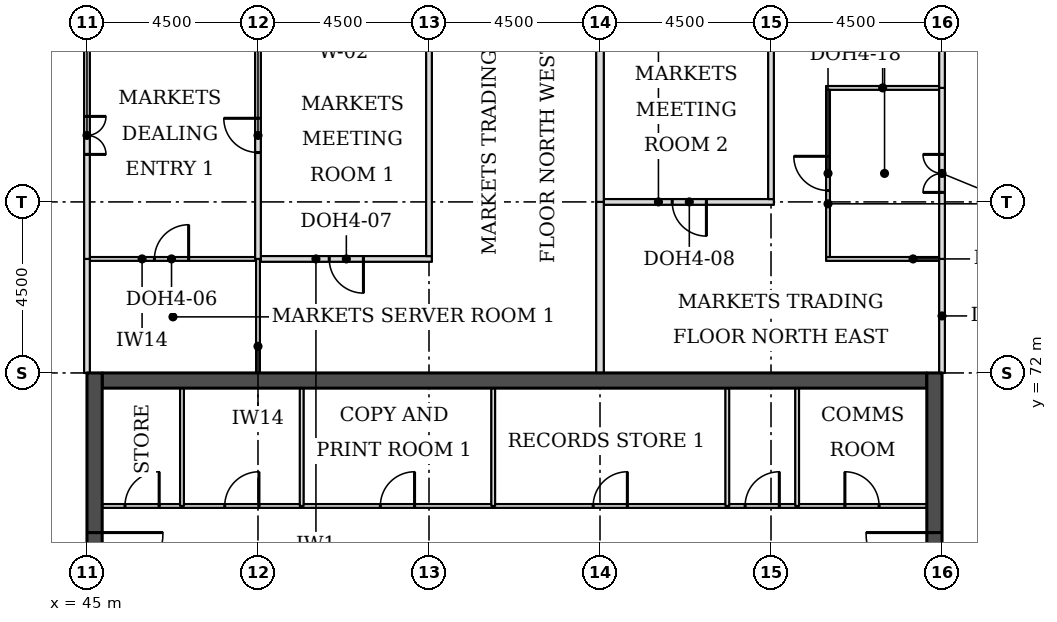
"""IFC4 building model, lengths in metres.
Left out: names, types, materials, properties, quantities, classifications, styles, units other than length and angle.
Written with IfcOpenShell. Run it as: python <this file> out.ifc"""

import sys

from ifc_helpers import new_model, si_unit, direction, frame, frame_2d, origin, place, context, subcontext, project, spatial, rectangle, extrude, element, fill, save


model = new_model("IFC4")
c1 = context("Model", 3, precision=1e-05, world=origin(), true_north=direction((0.0, 1.0)))
c2 = subcontext(c1, "Body", "Model", "MODEL_VIEW")
j1 = project(units=[si_unit("LENGTHUNIT", "METRE"), si_unit("PLANEANGLEUNIT", "RADIAN")], contexts=[c1])
p1 = place(None, origin())
s1 = spatial("IfcSite", under=j1, at=p1, CompositionType="ELEMENT")
p2 = place(p1, origin())
s2 = spatial("IfcBuilding", under=s1, at=p2, CompositionType="ELEMENT")
p3 = place(p2, frame((0.0, 0.0, 169.9)))
s3 = spatial("IfcBuildingStorey", under=s2, at=p3, CompositionType="ELEMENT", Elevation=169.9)
p4 = place(p3, frame((45.4, 71.8, 0.0), z_axis=(0.0, 0.0, 1.0), x_axis=(1.0, 0.0, 0.0)))
e1 = element("IfcWall", 1, at=p4, inside=s3, PredefinedType="SHEAR", context=c2, shape_type="SweptSolid", body=[
    extrude(rectangle(XDim=21.7, YDim=0.4, at=frame_2d((10.85, 0.0))), origin(), (0.0, 0.0, 1.0), 3.7),
])
p5 = place(p3, frame((45.2, 49.5, 0.0), z_axis=(0.0, 0.0, 1.0), x_axis=(0.0, 1.0, 0.0)))
e2 = element("IfcWall", 2, at=p5, inside=s3, PredefinedType="SHEAR", context=c2, shape_type="SweptSolid", body=[
    extrude(rectangle(XDim=22.5, YDim=0.4, at=frame_2d((11.25, 0.0))), origin(), (0.0, 0.0, 1.0), 3.7),
])
p6 = place(p5, frame((4.2, 0.0, 0.0)))
e3 = element("IfcOpeningElement", 3, at=p6, cuts=e2, PredefinedType="OPENING", context=c2, shape_type="SweptSolid", body=[
    extrude(rectangle(XDim=1.8, YDim=2.1, at=frame_2d((0.9, 1.05))), frame((0.0, 0.21, 0.0), z_axis=(0.0, -1.0, 0.0), x_axis=(1.0, 0.0, 0.0)), (0.0, 0.0, 1.0), 0.42),
])
p7 = place(p5, frame((6.9, 0.0, 0.0)))
e4 = element("IfcOpeningElement", 4, at=p7, cuts=e2, PredefinedType="OPENING", context=c2, shape_type="SweptSolid", body=[
    extrude(rectangle(XDim=1.1, YDim=2.1, at=frame_2d((0.55, 1.05))), frame((0.0, 0.21, 0.0), z_axis=(0.0, -1.0, 0.0), x_axis=(1.0, 0.0, 0.0)), (0.0, 0.0, 1.0), 0.42),
])
p8 = place(p5, frame((13.6, 0.0, 0.0)))
e5 = element("IfcOpeningElement", 5, at=p8, cuts=e2, PredefinedType="OPENING", context=c2, shape_type="SweptSolid", body=[
    extrude(rectangle(XDim=1.1, YDim=2.1, at=frame_2d((0.55, 1.05))), frame((0.0, 0.21, 0.0), z_axis=(0.0, -1.0, 0.0), x_axis=(1.0, 0.0, 0.0)), (0.0, 0.0, 1.0), 0.42),
])
p9 = place(p5, frame((16.5, 0.0, 0.0)))
e6 = element("IfcOpeningElement", 6, at=p9, cuts=e2, PredefinedType="OPENING", context=c2, shape_type="SweptSolid", body=[
    extrude(rectangle(XDim=1.8, YDim=2.1, at=frame_2d((0.9, 1.05))), frame((0.0, 0.21, 0.0), z_axis=(0.0, -1.0, 0.0), x_axis=(1.0, 0.0, 0.0)), (0.0, 0.0, 1.0), 0.42),
])
p10 = place(p3, frame((67.3, 49.5, 0.0), z_axis=(0.0, 0.0, 1.0), x_axis=(0.0, 1.0, 0.0)))
e7 = element("IfcWall", 7, at=p10, inside=s3, PredefinedType="SHEAR", context=c2, shape_type="SweptSolid", body=[
    extrude(rectangle(XDim=22.5, YDim=0.4, at=frame_2d((11.25, 0.0))), origin(), (0.0, 0.0, 1.0), 3.7),
])
p11 = place(p10, frame((4.2, 0.0, 0.0)))
e8 = element("IfcOpeningElement", 8, at=p11, cuts=e7, PredefinedType="OPENING", context=c2, shape_type="SweptSolid", body=[
    extrude(rectangle(XDim=1.8, YDim=2.1, at=frame_2d((0.9, 1.05))), frame((0.0, 0.21, 0.0), z_axis=(0.0, -1.0, 0.0), x_axis=(1.0, 0.0, 0.0)), (0.0, 0.0, 1.0), 0.42),
])
p12 = place(p10, frame((6.9, 0.0, 0.0)))
e9 = element("IfcOpeningElement", 9, at=p12, cuts=e7, PredefinedType="OPENING", context=c2, shape_type="SweptSolid", body=[
    extrude(rectangle(XDim=1.1, YDim=2.1, at=frame_2d((0.55, 1.05))), frame((0.0, 0.21, 0.0), z_axis=(0.0, -1.0, 0.0), x_axis=(1.0, 0.0, 0.0)), (0.0, 0.0, 1.0), 0.42),
])
p13 = place(p10, frame((13.6, 0.0, 0.0)))
e10 = element("IfcOpeningElement", 10, at=p13, cuts=e7, PredefinedType="OPENING", context=c2, shape_type="SweptSolid", body=[
    extrude(rectangle(XDim=1.1, YDim=2.1, at=frame_2d((0.55, 1.05))), frame((0.0, 0.21, 0.0), z_axis=(0.0, -1.0, 0.0), x_axis=(1.0, 0.0, 0.0)), (0.0, 0.0, 1.0), 0.42),
])
p14 = place(p10, frame((16.5, 0.0, 0.0)))
e11 = element("IfcOpeningElement", 11, at=p14, cuts=e7, PredefinedType="OPENING", context=c2, shape_type="SweptSolid", body=[
    extrude(rectangle(XDim=1.8, YDim=2.1, at=frame_2d((0.9, 1.05))), frame((0.0, 0.21, 0.0), z_axis=(0.0, -1.0, 0.0), x_axis=(1.0, 0.0, 0.0)), (0.0, 0.0, 1.0), 0.42),
])
p15 = place(p3, frame((45.075, 75.0, 0.0), z_axis=(0.0, 0.0, 1.0), x_axis=(1.0, 0.0, 0.0)))
e12 = element("IfcWall", 12, at=p15, inside=s3, PredefinedType="PARTITIONING", context=c2, shape_type="SweptSolid", body=[
    extrude(rectangle(XDim=4.35, YDim=0.1, at=frame_2d((2.175, 0.0))), origin(), (0.0, 0.0, 1.0), 3.55),
])
p16 = place(p15, frame((1.7, 0.0, 0.0)))
e13 = element("IfcOpeningElement", 13, at=p16, cuts=e12, PredefinedType="OPENING", context=c2, shape_type="SweptSolid", body=[
    extrude(rectangle(XDim=0.9, YDim=2.1, at=frame_2d((0.45, 1.05))), frame((0.0, 0.06, 0.0), z_axis=(0.0, -1.0, 0.0), x_axis=(1.0, 0.0, 0.0)), (0.0, 0.0, 1.0), 0.12),
])
p17 = place(p3, frame((49.575, 75.0, 0.0), z_axis=(0.0, 0.0, 1.0), x_axis=(1.0, 0.0, 0.0)))
e14 = element("IfcWall", 14, at=p17, inside=s3, PredefinedType="PARTITIONING", context=c2, shape_type="SweptSolid", body=[
    extrude(rectangle(XDim=4.5, YDim=0.15, at=frame_2d((2.25, 0.0))), origin(), (0.0, 0.0, 1.0), 3.55),
])
p18 = place(p17, frame((1.8, 0.0, 0.0)))
e15 = element("IfcOpeningElement", 15, at=p18, cuts=e14, PredefinedType="OPENING", context=c2, shape_type="SweptSolid", body=[
    extrude(rectangle(XDim=0.9, YDim=2.1, at=frame_2d((0.45, 1.05))), frame((0.0, 0.085, 0.0), z_axis=(0.0, -1.0, 0.0), x_axis=(1.0, 0.0, 0.0)), (0.0, 0.0, 1.0), 0.17),
])
p19 = place(p3, frame((64.45, 75.0, 0.0), z_axis=(0.0, 0.0, 1.0), x_axis=(1.0, 0.0, 0.0)))
e16 = element("IfcWall", 16, at=p19, inside=s3, PredefinedType="PARTITIONING", context=c2, shape_type="SweptSolid", body=[
    extrude(rectangle(XDim=2.975, YDim=0.1, at=frame_2d((1.488, 0.0))), origin(), (0.0, 0.0, 1.0), 3.55),
])
p20 = place(p3, frame((58.6, 76.5, 0.0), z_axis=(0.0, 0.0, 1.0), x_axis=(1.0, 0.0, 0.0)))
e17 = element("IfcWall", 17, at=p20, inside=s3, PredefinedType="PARTITIONING", context=c2, shape_type="SweptSolid", body=[
    extrude(rectangle(XDim=4.475, YDim=0.15, at=frame_2d((2.237, 0.0))), origin(), (0.0, 0.0, 1.0), 3.55),
])
p21 = place(p20, frame((1.8, 0.0, 0.0)))
e18 = element("IfcOpeningElement", 18, at=p21, cuts=e17, PredefinedType="OPENING", context=c2, shape_type="SweptSolid", body=[
    extrude(rectangle(XDim=0.9, YDim=2.1, at=frame_2d((0.45, 1.05))), frame((0.0, 0.085, 0.0), z_axis=(0.0, -1.0, 0.0), x_axis=(1.0, 0.0, 0.0)), (0.0, 0.0, 1.0), 0.17),
])
p22 = place(p3, frame((64.45, 79.5, 0.0), z_axis=(0.0, 0.0, 1.0), x_axis=(1.0, 0.0, 0.0)))
e19 = element("IfcWall", 19, at=p22, inside=s3, PredefinedType="PARTITIONING", context=c2, shape_type="SweptSolid", body=[
    extrude(rectangle(XDim=2.975, YDim=0.1, at=frame_2d((1.488, 0.0))), origin(), (0.0, 0.0, 1.0), 3.55),
])
p23 = place(p3, frame((45.0, 72.0, 0.0), z_axis=(0.0, 0.0, 1.0), x_axis=(0.0, 1.0, 0.0)))
e20 = element("IfcWall", 20, at=p23, inside=s3, PredefinedType="PARTITIONING", context=c2, shape_type="SweptSolid", body=[
    extrude(rectangle(XDim=3.0, YDim=0.15, at=frame_2d((1.5, 0.0))), origin(), (0.0, 0.0, 1.0), 3.022),
])
p24 = place(p3, frame((49.5, 72.0, 0.0), z_axis=(0.0, 0.0, 1.0), x_axis=(0.0, 1.0, 0.0)))
e21 = element("IfcWall", 21, at=p24, inside=s3, PredefinedType="PARTITIONING", context=c2, shape_type="SweptSolid", body=[
    extrude(rectangle(XDim=3.0, YDim=0.1, at=frame_2d((1.5, 0.0))), origin(), (0.0, 0.0, 1.0), 3.55),
])
p25 = place(p3, frame((58.5, 72.0, 0.0), z_axis=(0.0, 0.0, 1.0), x_axis=(0.0, 1.0, 0.0)))
e22 = element("IfcWall", 22, at=p25, inside=s3, PredefinedType="PARTITIONING", context=c2, shape_type="SweptSolid", body=[
    extrude(rectangle(XDim=4.5, YDim=0.2, at=frame_2d((2.25, 0.0))), origin(), (0.0, 0.0, 1.0), 3.55),
])
p26 = place(p3, frame((67.5, 72.0, 0.0), z_axis=(0.0, 0.0, 1.0), x_axis=(0.0, 1.0, 0.0)))
e23 = element("IfcWall", 23, at=p26, inside=s3, PredefinedType="PARTITIONING", context=c2, shape_type="SweptSolid", body=[
    extrude(rectangle(XDim=3.0, YDim=0.15, at=frame_2d((1.5, 0.0))), origin(), (0.0, 0.0, 1.0), 3.022),
])
p27 = place(p3, frame((45.0, 75.0, 0.0), z_axis=(0.0, 0.0, 1.0), x_axis=(0.0, 1.0, 0.0)))
e24 = element("IfcWall", 24, at=p27, inside=s3, PredefinedType="PARTITIONING", context=c2, shape_type="SweptSolid", body=[
    extrude(rectangle(XDim=6.45, YDim=0.15, at=frame_2d((3.225, 0.0))), origin(), (0.0, 0.0, 1.0), 3.022),
])
p28 = place(p27, frame((2.75, 0.0, 0.0)))
e25 = element("IfcOpeningElement", 25, at=p28, cuts=e24, PredefinedType="OPENING", context=c2, shape_type="SweptSolid", body=[
    extrude(rectangle(XDim=1.0, YDim=2.1, at=frame_2d((0.5, 1.05))), frame((0.0, 0.085, 0.0), z_axis=(0.0, -1.0, 0.0), x_axis=(1.0, 0.0, 0.0)), (0.0, 0.0, 1.0), 0.17),
])
p29 = place(p3, frame((49.5, 75.0, 0.0), z_axis=(0.0, 0.0, 1.0), x_axis=(0.0, 1.0, 0.0)))
e26 = element("IfcWall", 26, at=p29, inside=s3, PredefinedType="PARTITIONING", context=c2, shape_type="SweptSolid", body=[
    extrude(rectangle(XDim=6.45, YDim=0.15, at=frame_2d((3.225, 0.0))), origin(), (0.0, 0.0, 1.0), 3.55),
])
p30 = place(p29, frame((2.8, 0.0, 0.0)))
e27 = element("IfcOpeningElement", 27, at=p30, cuts=e26, PredefinedType="OPENING", context=c2, shape_type="SweptSolid", body=[
    extrude(rectangle(XDim=0.9, YDim=2.1, at=frame_2d((0.45, 1.05))), frame((0.0, 0.085, 0.0), z_axis=(0.0, -1.0, 0.0), x_axis=(1.0, 0.0, 0.0)), (0.0, 0.0, 1.0), 0.17),
])
p31 = place(p3, frame((67.5, 75.0, 0.0), z_axis=(0.0, 0.0, 1.0), x_axis=(0.0, 1.0, 0.0)))
e28 = element("IfcWall", 28, at=p31, inside=s3, PredefinedType="PARTITIONING", context=c2, shape_type="SweptSolid", body=[
    extrude(rectangle(XDim=4.5, YDim=0.15, at=frame_2d((2.25, 0.0))), origin(), (0.0, 0.0, 1.0), 3.022),
])
p32 = place(p31, frame((1.75, 0.0, 0.0)))
e29 = element("IfcOpeningElement", 29, at=p32, cuts=e28, PredefinedType="OPENING", context=c2, shape_type="SweptSolid", body=[
    extrude(rectangle(XDim=1.0, YDim=2.1, at=frame_2d((0.5, 1.05))), frame((0.0, 0.085, 0.0), z_axis=(0.0, -1.0, 0.0), x_axis=(1.0, 0.0, 0.0)), (0.0, 0.0, 1.0), 0.17),
])
p33 = place(p3, frame((64.5, 75.05, 0.0), z_axis=(0.0, 0.0, 1.0), x_axis=(0.0, 1.0, 0.0)))
e30 = element("IfcWall", 30, at=p33, inside=s3, PredefinedType="PARTITIONING", context=c2, shape_type="SweptSolid", body=[
    extrude(rectangle(XDim=4.4, YDim=0.1, at=frame_2d((2.2, 0.0))), origin(), (0.0, 0.0, 1.0), 3.55),
])
p34 = place(p33, frame((1.75, 0.0, 0.0)))
e31 = element("IfcOpeningElement", 31, at=p34, cuts=e30, PredefinedType="OPENING", context=c2, shape_type="SweptSolid", body=[
    extrude(rectangle(XDim=0.9, YDim=2.1, at=frame_2d((0.45, 1.05))), frame((0.0, 0.06, 0.0), z_axis=(0.0, -1.0, 0.0), x_axis=(1.0, 0.0, 0.0)), (0.0, 0.0, 1.0), 0.12),
])
p35 = place(p3, frame((54.0, 75.075, 0.0), z_axis=(0.0, 0.0, 1.0), x_axis=(0.0, 1.0, 0.0)))
e32 = element("IfcWall", 32, at=p35, inside=s3, PredefinedType="PARTITIONING", context=c2, shape_type="SweptSolid", body=[
    extrude(rectangle(XDim=6.375, YDim=0.15, at=frame_2d((3.188, 0.0))), origin(), (0.0, 0.0, 1.0), 3.55),
])
p36 = place(p3, frame((58.5, 76.5, 0.0), z_axis=(0.0, 0.0, 1.0), x_axis=(0.0, 1.0, 0.0)))
e33 = element("IfcWall", 33, at=p36, inside=s3, PredefinedType="PARTITIONING", context=c2, shape_type="SweptSolid", body=[
    extrude(rectangle(XDim=4.95, YDim=0.2, at=frame_2d((2.475, 0.0))), origin(), (0.0, 0.0, 1.0), 3.55),
])
p37 = place(p3, frame((63.0, 76.575, 0.0), z_axis=(0.0, 0.0, 1.0), x_axis=(0.0, 1.0, 0.0)))
e34 = element("IfcWall", 34, at=p37, inside=s3, PredefinedType="PARTITIONING", context=c2, shape_type="SweptSolid", body=[
    extrude(rectangle(XDim=4.875, YDim=0.15, at=frame_2d((2.438, 0.0))), origin(), (0.0, 0.0, 1.0), 3.55),
])
p38 = place(p3, frame((67.5, 79.5, 0.0), z_axis=(0.0, 0.0, 1.0), x_axis=(0.0, 1.0, 0.0)))
e35 = element("IfcWall", 35, at=p38, inside=s3, PredefinedType="PARTITIONING", context=c2, shape_type="SweptSolid", body=[
    extrude(rectangle(XDim=1.95, YDim=0.15, at=frame_2d((0.975, 0.0))), origin(), (0.0, 0.0, 1.0), 3.022),
])
p39 = place(p3, frame((45.4, 68.5, 0.0), z_axis=(0.0, 0.0, 1.0), x_axis=(1.0, 0.0, 0.0)))
e36 = element("IfcWall", 36, at=p39, inside=s3, PredefinedType="PARTITIONING", context=c2, shape_type="SweptSolid", body=[
    extrude(rectangle(XDim=21.7, YDim=0.1, at=frame_2d((10.85, 0.0))), origin(), (0.0, 0.0, 1.0), 3.55),
])
p40 = place(p39, frame((19.544, 0.0, 0.0)))
e37 = element("IfcOpeningElement", 37, at=p40, cuts=e36, PredefinedType="OPENING", context=c2, shape_type="SweptSolid", body=[
    extrude(rectangle(XDim=0.9, YDim=2.1, at=frame_2d((0.45, 1.05))), frame((0.0, 0.06, 0.0), z_axis=(0.0, -1.0, 0.0), x_axis=(1.0, 0.0, 0.0)), (0.0, 0.0, 1.0), 0.12),
])
p41 = place(p39, frame((16.919, 0.0, 0.0)))
e38 = element("IfcOpeningElement", 38, at=p41, cuts=e36, PredefinedType="OPENING", context=c2, shape_type="SweptSolid", body=[
    extrude(rectangle(XDim=0.9, YDim=2.1, at=frame_2d((0.45, 1.05))), frame((0.0, 0.06, 0.0), z_axis=(0.0, -1.0, 0.0), x_axis=(1.0, 0.0, 0.0)), (0.0, 0.0, 1.0), 0.12),
])
p42 = place(p39, frame((0.6, 0.0, 0.0)))
e39 = element("IfcOpeningElement", 39, at=p42, cuts=e36, PredefinedType="OPENING", context=c2, shape_type="SweptSolid", body=[
    extrude(rectangle(XDim=0.9, YDim=2.1, at=frame_2d((0.45, 1.05))), frame((0.0, 0.06, 0.0), z_axis=(0.0, -1.0, 0.0), x_axis=(1.0, 0.0, 0.0)), (0.0, 0.0, 1.0), 0.12),
])
p43 = place(p39, frame((3.225, 0.0, 0.0)))
e40 = element("IfcOpeningElement", 40, at=p43, cuts=e36, PredefinedType="OPENING", context=c2, shape_type="SweptSolid", body=[
    extrude(rectangle(XDim=0.9, YDim=2.1, at=frame_2d((0.45, 1.05))), frame((0.0, 0.06, 0.0), z_axis=(0.0, -1.0, 0.0), x_axis=(1.0, 0.0, 0.0)), (0.0, 0.0, 1.0), 0.12),
])
p44 = place(p39, frame((12.92, 0.0, 0.0)))
e41 = element("IfcOpeningElement", 41, at=p44, cuts=e36, PredefinedType="OPENING", context=c2, shape_type="SweptSolid", body=[
    extrude(rectangle(XDim=0.9, YDim=2.1, at=frame_2d((0.45, 1.05))), frame((0.0, 0.06, 0.0), z_axis=(0.0, -1.0, 0.0), x_axis=(1.0, 0.0, 0.0)), (0.0, 0.0, 1.0), 0.12),
])
p45 = place(p39, frame((7.32, 0.0, 0.0)))
e42 = element("IfcOpeningElement", 42, at=p45, cuts=e36, PredefinedType="OPENING", context=c2, shape_type="SweptSolid", body=[
    extrude(rectangle(XDim=0.9, YDim=2.1, at=frame_2d((0.45, 1.05))), frame((0.0, 0.06, 0.0), z_axis=(0.0, -1.0, 0.0), x_axis=(1.0, 0.0, 0.0)), (0.0, 0.0, 1.0), 0.12),
])
for number, where, z_axis, x_axis in (
    (43, (47.5, 68.5, 0.0), (0.0, 0.0, 1.0), (0.0, 1.0, 0.0)),
    (44, (50.65, 68.5, 0.0), (0.0, 0.0, 1.0), (0.0, 1.0, 0.0)),
    (45, (55.69, 68.5, 0.0), (0.0, 0.0, 1.0), (0.0, 1.0, 0.0)),
    (46, (61.85, 68.5, 0.0), (0.0, 0.0, 1.0), (0.0, 1.0, 0.0)),
    (47, (63.688, 68.5, 0.0), (0.0, 0.0, 1.0), (0.0, 1.0, 0.0)),
):
    element("IfcWall", number, at=place(p3, frame(where, z_axis=z_axis, x_axis=x_axis)), inside=s3, PredefinedType="PARTITIONING", context=c2, shape_type="SweptSolid", body=[
        extrude(rectangle(XDim=3.1, YDim=0.1, at=frame_2d((1.55, 0.0))), origin(), (0.0, 0.0, 1.0), 3.55),
    ])
p46 = place(p28, frame((1.0, 0.0, 0.0), z_axis=(0.0, 0.0, 1.0), x_axis=(-1.0, 0.0, 0.0)))
e48 = element("IfcDoor", 48, at=p46, inside=s3, OperationType="DOUBLE_DOOR_SINGLE_SWING", PredefinedType="DOOR", context=c2, shape_type="SweptSolid", body=[
    extrude(rectangle(XDim=1.0, YDim=2.1, at=frame_2d((0.5, 1.05))), frame((0.0, 0.025, 0.0), z_axis=(0.0, -1.0, 0.0), x_axis=(1.0, 0.0, 0.0)), (0.0, 0.0, 1.0), 0.05),
])
fill(e25, e48)
p47 = place(p30, origin())
e49 = element("IfcDoor", 49, at=p47, inside=s3, OperationType="SINGLE_SWING_RIGHT", PredefinedType="DOOR", context=c2, shape_type="SweptSolid", body=[
    extrude(rectangle(XDim=0.9, YDim=2.1, at=frame_2d((0.45, 1.05))), frame((0.0, 0.025, 0.0), z_axis=(0.0, -1.0, 0.0), x_axis=(1.0, 0.0, 0.0)), (0.0, 0.0, 1.0), 0.05),
])
fill(e27, e49)
p48 = place(p16, origin())
e50 = element("IfcDoor", 50, at=p48, inside=s3, OperationType="SINGLE_SWING_RIGHT", PredefinedType="DOOR", context=c2, shape_type="SweptSolid", body=[
    extrude(rectangle(XDim=0.9, YDim=2.1, at=frame_2d((0.45, 1.05))), frame((0.0, 0.025, 0.0), z_axis=(0.0, -1.0, 0.0), x_axis=(1.0, 0.0, 0.0)), (0.0, 0.0, 1.0), 0.05),
])
fill(e13, e50)
p49 = place(p18, frame((0.9, 0.0, 0.0), z_axis=(0.0, 0.0, 1.0), x_axis=(-1.0, 0.0, 0.0)))
e51 = element("IfcDoor", 51, at=p49, inside=s3, OperationType="SINGLE_SWING_LEFT", PredefinedType="DOOR", context=c2, shape_type="SweptSolid", body=[
    extrude(rectangle(XDim=0.9, YDim=2.1, at=frame_2d((0.45, 1.05))), frame((0.0, 0.025, 0.0), z_axis=(0.0, -1.0, 0.0), x_axis=(1.0, 0.0, 0.0)), (0.0, 0.0, 1.0), 0.05),
])
fill(e15, e51)
p50 = place(p32, origin())
e52 = element("IfcDoor", 52, at=p50, inside=s3, OperationType="DOUBLE_DOOR_SINGLE_SWING", PredefinedType="DOOR", context=c2, shape_type="SweptSolid", body=[
    extrude(rectangle(XDim=1.0, YDim=2.1, at=frame_2d((0.5, 1.05))), frame((0.0, 0.025, 0.0), z_axis=(0.0, -1.0, 0.0), x_axis=(1.0, 0.0, 0.0)), (0.0, 0.0, 1.0), 0.05),
])
fill(e29, e52)
p51 = place(p34, origin())
e53 = element("IfcDoor", 53, at=p51, inside=s3, OperationType="SINGLE_SWING_RIGHT", PredefinedType="DOOR", context=c2, shape_type="SweptSolid", body=[
    extrude(rectangle(XDim=0.9, YDim=2.1, at=frame_2d((0.45, 1.05))), frame((0.0, 0.025, 0.0), z_axis=(0.0, -1.0, 0.0), x_axis=(1.0, 0.0, 0.0)), (0.0, 0.0, 1.0), 0.05),
])
fill(e31, e53)
p52 = place(p21, frame((0.9, 0.0, 0.0), z_axis=(0.0, 0.0, 1.0), x_axis=(-1.0, 0.0, 0.0)))
e54 = element("IfcDoor", 54, at=p52, inside=s3, OperationType="SINGLE_SWING_LEFT", PredefinedType="DOOR", context=c2, shape_type="SweptSolid", body=[
    extrude(rectangle(XDim=0.9, YDim=2.1, at=frame_2d((0.45, 1.05))), frame((0.0, 0.025, 0.0), z_axis=(0.0, -1.0, 0.0), x_axis=(1.0, 0.0, 0.0)), (0.0, 0.0, 1.0), 0.05),
])
fill(e18, e54)
p53 = place(p9, frame((1.8, 0.0, 0.0), z_axis=(0.0, 0.0, 1.0), x_axis=(-1.0, 0.0, 0.0)))
e55 = element("IfcDoor", 55, at=p53, inside=s3, OperationType="SINGLE_SWING_LEFT", PredefinedType="DOOR", context=c2, shape_type="SweptSolid", body=[
    extrude(rectangle(XDim=1.8, YDim=2.1, at=frame_2d((0.9, 1.05))), frame((0.0, 0.025, 0.0), z_axis=(0.0, -1.0, 0.0), x_axis=(1.0, 0.0, 0.0)), (0.0, 0.0, 1.0), 0.05),
])
fill(e6, e55)
p54 = place(p14, origin())
e56 = element("IfcDoor", 56, at=p54, inside=s3, OperationType="SINGLE_SWING_RIGHT", PredefinedType="DOOR", context=c2, shape_type="SweptSolid", body=[
    extrude(rectangle(XDim=1.8, YDim=2.1, at=frame_2d((0.9, 1.05))), frame((0.0, 0.025, 0.0), z_axis=(0.0, -1.0, 0.0), x_axis=(1.0, 0.0, 0.0)), (0.0, 0.0, 1.0), 0.05),
])
fill(e11, e56)
p55 = place(p40, origin())
e57 = element("IfcDoor", 57, at=p55, inside=s3, OperationType="SINGLE_SWING_LEFT", PredefinedType="DOOR", context=c2, shape_type="SweptSolid", body=[
    extrude(rectangle(XDim=0.9, YDim=2.1, at=frame_2d((0.45, 1.05))), frame((0.0, 0.025, 0.0), z_axis=(0.0, -1.0, 0.0), x_axis=(1.0, 0.0, 0.0)), (0.0, 0.0, 1.0), 0.05),
])
fill(e37, e57)
p56 = place(p41, origin())
e58 = element("IfcDoor", 58, at=p56, inside=s3, OperationType="SINGLE_SWING_RIGHT", PredefinedType="DOOR", context=c2, shape_type="SweptSolid", body=[
    extrude(rectangle(XDim=0.9, YDim=2.1, at=frame_2d((0.45, 1.05))), frame((0.0, 0.025, 0.0), z_axis=(0.0, -1.0, 0.0), x_axis=(1.0, 0.0, 0.0)), (0.0, 0.0, 1.0), 0.05),
])
fill(e38, e58)
p57 = place(p42, origin())
e59 = element("IfcDoor", 59, at=p57, inside=s3, OperationType="SINGLE_SWING_RIGHT", PredefinedType="DOOR", context=c2, shape_type="SweptSolid", body=[
    extrude(rectangle(XDim=0.9, YDim=2.1, at=frame_2d((0.45, 1.05))), frame((0.0, 0.025, 0.0), z_axis=(0.0, -1.0, 0.0), x_axis=(1.0, 0.0, 0.0)), (0.0, 0.0, 1.0), 0.05),
])
fill(e39, e59)
p58 = place(p43, origin())
e60 = element("IfcDoor", 60, at=p58, inside=s3, OperationType="SINGLE_SWING_RIGHT", PredefinedType="DOOR", context=c2, shape_type="SweptSolid", body=[
    extrude(rectangle(XDim=0.9, YDim=2.1, at=frame_2d((0.45, 1.05))), frame((0.0, 0.025, 0.0), z_axis=(0.0, -1.0, 0.0), x_axis=(1.0, 0.0, 0.0)), (0.0, 0.0, 1.0), 0.05),
])
fill(e40, e60)
p59 = place(p44, origin())
e61 = element("IfcDoor", 61, at=p59, inside=s3, OperationType="SINGLE_SWING_RIGHT", PredefinedType="DOOR", context=c2, shape_type="SweptSolid", body=[
    extrude(rectangle(XDim=0.9, YDim=2.1, at=frame_2d((0.45, 1.05))), frame((0.0, 0.025, 0.0), z_axis=(0.0, -1.0, 0.0), x_axis=(1.0, 0.0, 0.0)), (0.0, 0.0, 1.0), 0.05),
])
fill(e41, e61)
p60 = place(p45, origin())
e62 = element("IfcDoor", 62, at=p60, inside=s3, OperationType="SINGLE_SWING_RIGHT", PredefinedType="DOOR", context=c2, shape_type="SweptSolid", body=[
    extrude(rectangle(XDim=0.9, YDim=2.1, at=frame_2d((0.45, 1.05))), frame((0.0, 0.025, 0.0), z_axis=(0.0, -1.0, 0.0), x_axis=(1.0, 0.0, 0.0)), (0.0, 0.0, 1.0), 0.05),
])
fill(e42, e62)
save(model, sys.argv[1])
